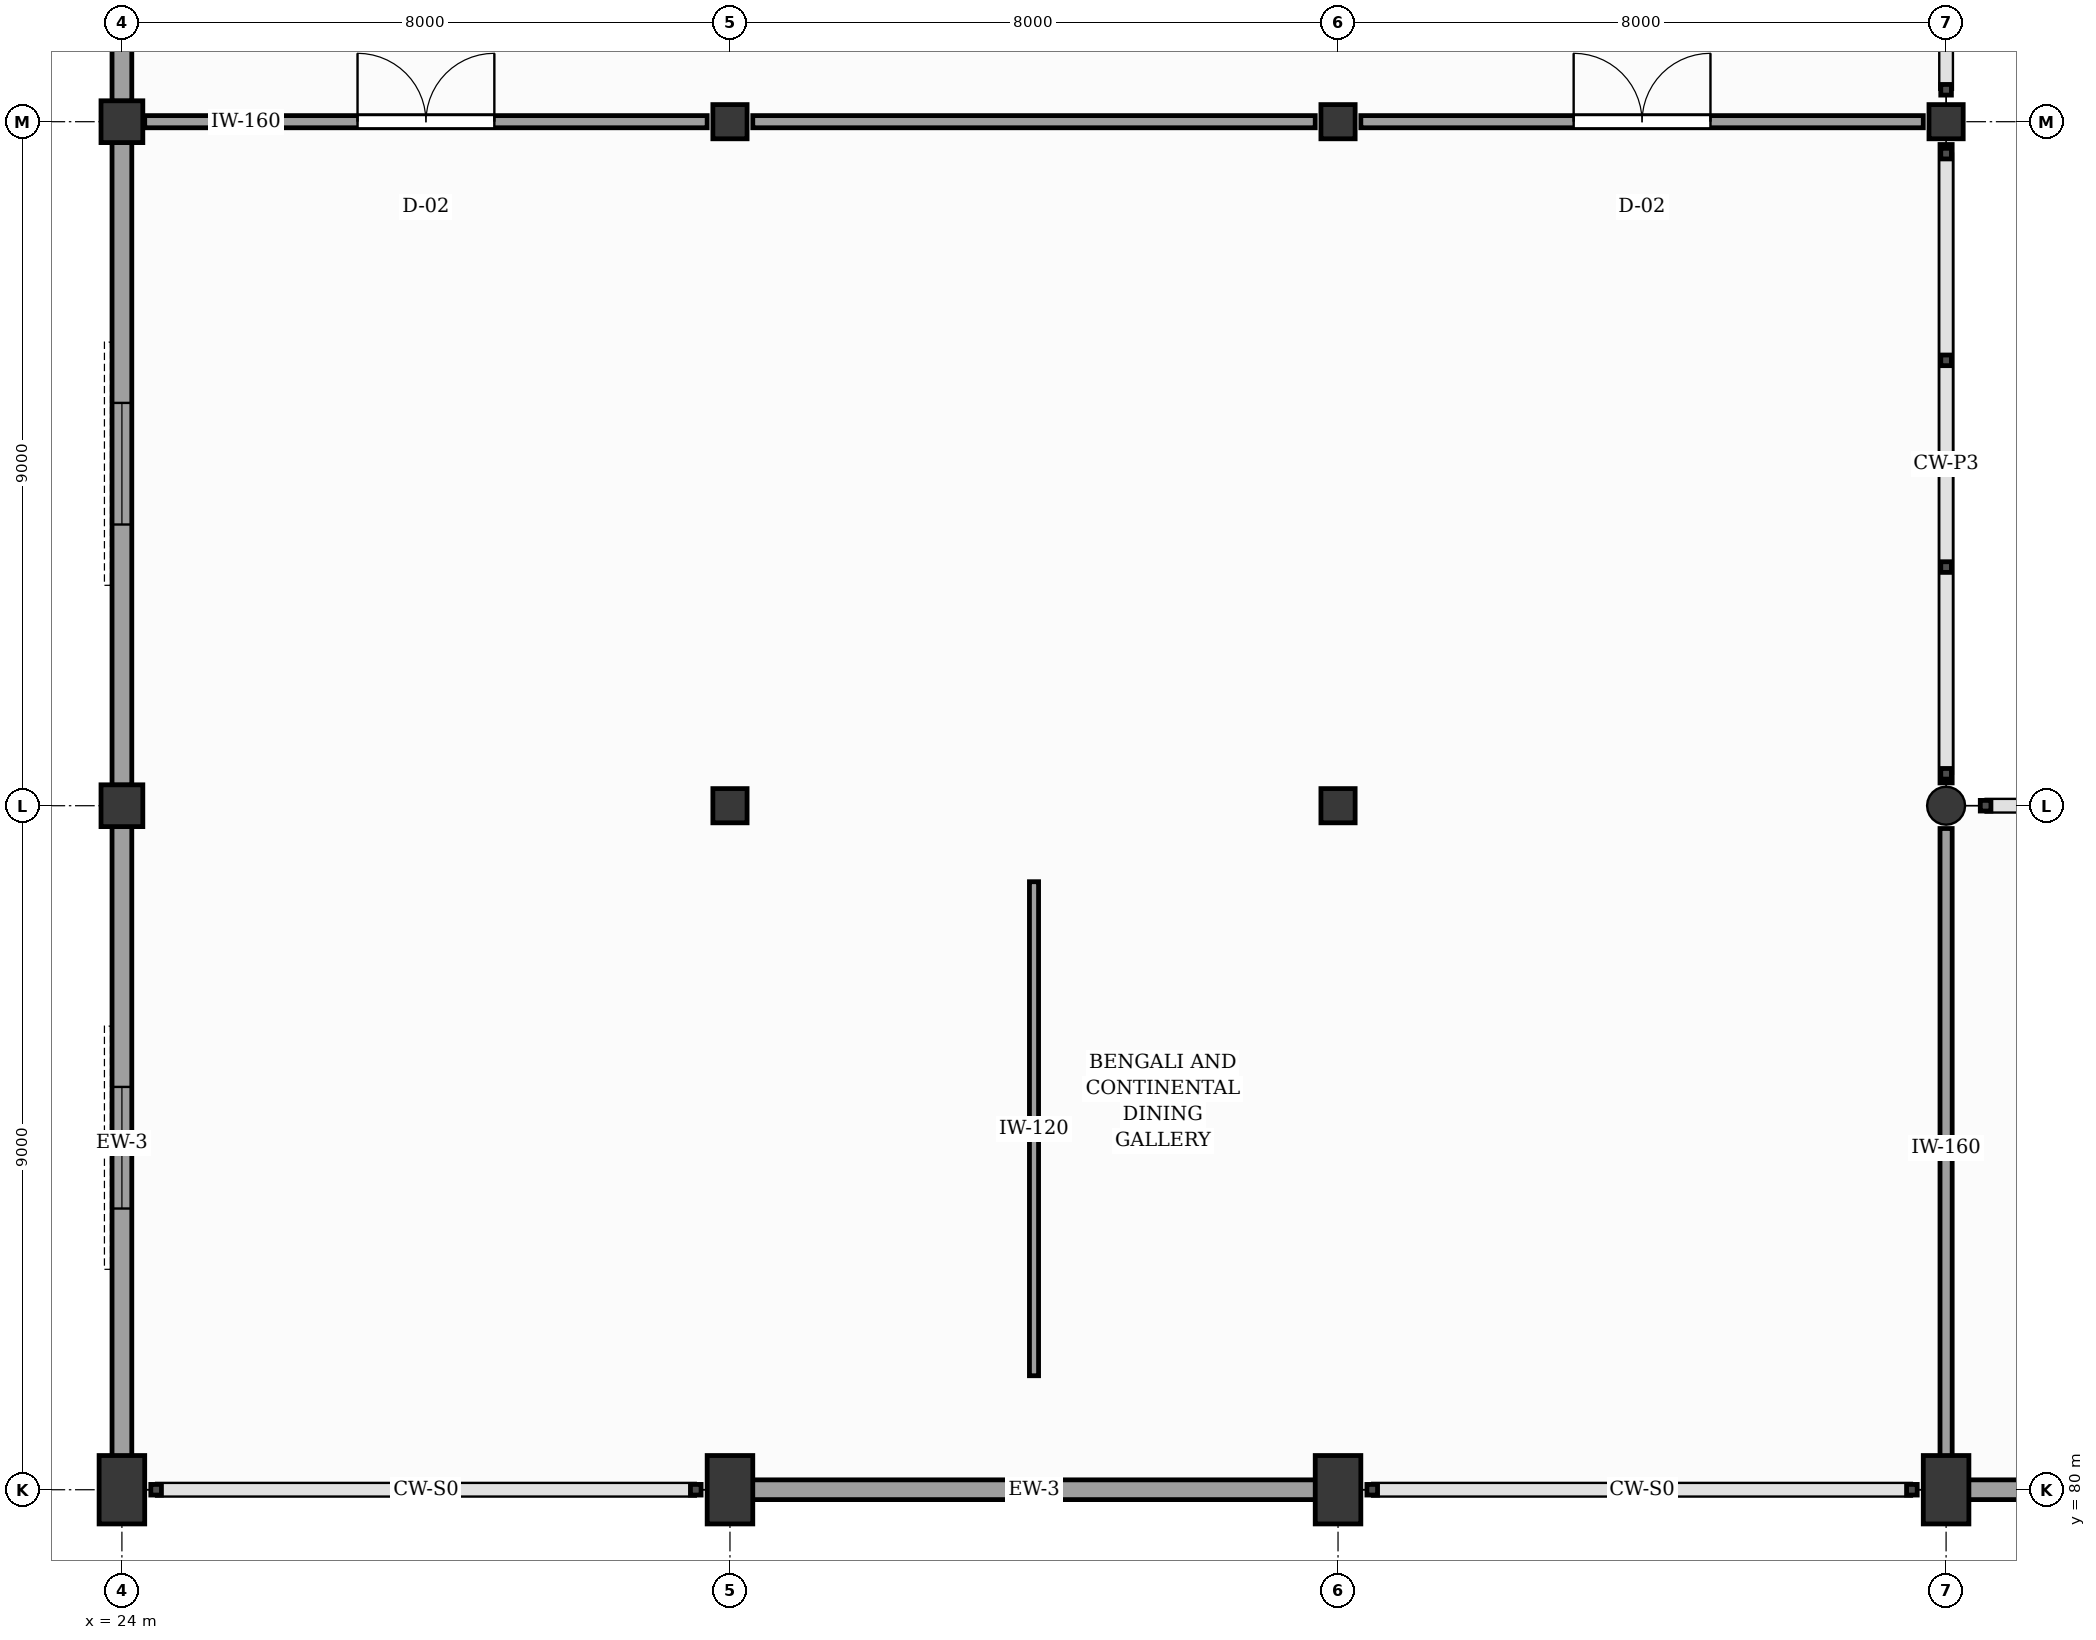
"""IFC4 building model, lengths in metres.
Left out: names, types, materials, properties, quantities, classifications, styles, units other than length and angle.
Written with IfcOpenShell. Run it as: python <this file> out.ifc"""

import sys

from ifc_helpers import new_model, si_unit, direction, frame, frame_2d, origin, origin_2d, place, context, subcontext, project, spatial, rectangle, circle, extrude, element, fill, save


model = new_model("IFC4")
c1 = context("Model", 3, precision=1e-05, world=origin(), true_north=direction((0.0, 1.0)))
c2 = subcontext(c1, "Body", "Model", "MODEL_VIEW")
j1 = project(units=[si_unit("LENGTHUNIT", "METRE"), si_unit("PLANEANGLEUNIT", "RADIAN")], contexts=[c1])
p1 = place(None, origin())
s1 = spatial("IfcSite", under=j1, at=p1, CompositionType="ELEMENT")
p2 = place(p1, origin())
s2 = spatial("IfcBuilding", under=s1, at=p2, CompositionType="ELEMENT")
p3 = place(p2, frame((0.0, 0.0, 16.2)))
s3 = spatial("IfcBuildingStorey", under=s2, at=p3, CompositionType="ELEMENT", Elevation=16.2)
p4 = place(p3, frame((24.0, 80.0, 0.0), z_axis=(0.0, 0.0, 1.0), x_axis=(1.0, 0.0, 0.0)))
e1 = element("IfcColumn", 1, at=p4, inside=s3, PredefinedType="COLUMN", context=c2, shape_type="SweptSolid", body=[
    extrude(rectangle(XDim=0.6, YDim=0.9, at=origin_2d()), origin(), (0.0, 0.0, 1.0), 4.2),
])
for number, where, z_axis, x_axis in (
    (2, (24.0, 89.0, 0.0), (0.0, 0.0, 1.0), (1.0, 0.0, 0.0)),
    (3, (24.0, 98.0, 0.0), (0.0, 0.0, 1.0), (1.0, 0.0, 0.0)),
):
    element("IfcColumn", number, at=place(p3, frame(where, z_axis=z_axis, x_axis=x_axis)), inside=s3, PredefinedType="COLUMN", context=c2, shape_type="SweptSolid", body=[
        extrude(rectangle(XDim=0.55, YDim=0.55, at=origin_2d()), origin(), (0.0, 0.0, 1.0), 4.2),
    ])
p5 = place(p3, frame((32.0, 80.0, 0.0), z_axis=(0.0, 0.0, 1.0), x_axis=(1.0, 0.0, 0.0)))
e4 = element("IfcColumn", 4, at=p5, inside=s3, PredefinedType="COLUMN", context=c2, shape_type="SweptSolid", body=[
    extrude(rectangle(XDim=0.6, YDim=0.9, at=origin_2d()), origin(), (0.0, 0.0, 1.0), 4.2),
])
for number, where, z_axis, x_axis in (
    (5, (32.0, 89.0, 0.0), (0.0, 0.0, 1.0), (1.0, 0.0, 0.0)),
    (6, (32.0, 98.0, 0.0), (0.0, 0.0, 1.0), (1.0, 0.0, 0.0)),
):
    element("IfcColumn", number, at=place(p3, frame(where, z_axis=z_axis, x_axis=x_axis)), inside=s3, PredefinedType="COLUMN", context=c2, shape_type="SweptSolid", body=[
        extrude(rectangle(XDim=0.45, YDim=0.45, at=origin_2d()), origin(), (0.0, 0.0, 1.0), 4.2),
    ])
p6 = place(p3, frame((40.0, 80.0, 0.0), z_axis=(0.0, 0.0, 1.0), x_axis=(1.0, 0.0, 0.0)))
e7 = element("IfcColumn", 7, at=p6, inside=s3, PredefinedType="COLUMN", context=c2, shape_type="SweptSolid", body=[
    extrude(rectangle(XDim=0.6, YDim=0.9, at=origin_2d()), origin(), (0.0, 0.0, 1.0), 4.2),
])
for number, where, z_axis, x_axis in (
    (8, (40.0, 89.0, 0.0), (0.0, 0.0, 1.0), (1.0, 0.0, 0.0)),
    (9, (40.0, 98.0, 0.0), (0.0, 0.0, 1.0), (1.0, 0.0, 0.0)),
):
    element("IfcColumn", number, at=place(p3, frame(where, z_axis=z_axis, x_axis=x_axis)), inside=s3, PredefinedType="COLUMN", context=c2, shape_type="SweptSolid", body=[
        extrude(rectangle(XDim=0.45, YDim=0.45, at=origin_2d()), origin(), (0.0, 0.0, 1.0), 4.2),
    ])
p7 = place(p3, frame((48.0, 80.0, 0.0), z_axis=(0.0, 0.0, 1.0), x_axis=(1.0, 0.0, 0.0)))
e10 = element("IfcColumn", 10, at=p7, inside=s3, PredefinedType="COLUMN", context=c2, shape_type="SweptSolid", body=[
    extrude(rectangle(XDim=0.6, YDim=0.9, at=origin_2d()), origin(), (0.0, 0.0, 1.0), 4.2),
])
p8 = place(p3, frame((48.0, 89.0, 0.0), z_axis=(0.0, 0.0, 1.0), x_axis=(1.0, 0.0, 0.0)))
e11 = element("IfcColumn", 11, at=p8, inside=s3, PredefinedType="COLUMN", context=c2, shape_type="SweptSolid", body=[
    extrude(circle(Radius=0.25, at=origin_2d()), origin(), (0.0, 0.0, 1.0), 4.2),
])
p9 = place(p3, frame((48.0, 98.0, 0.0), z_axis=(0.0, 0.0, 1.0), x_axis=(1.0, 0.0, 0.0)))
e12 = element("IfcColumn", 12, at=p9, inside=s3, PredefinedType="COLUMN", context=c2, shape_type="SweptSolid", body=[
    extrude(rectangle(XDim=0.45, YDim=0.45, at=origin_2d()), origin(), (0.0, 0.0, 1.0), 4.2),
])
for number, where, z_axis, x_axis in (
    (13, (32.295, 80.0, 0.0), (0.0, 0.0, 1.0), (1.0, 0.0, 0.0)),
    (14, (48.295, 80.0, 0.0), (0.0, 0.0, 1.0), (1.0, 0.0, 0.0)),
):
    element("IfcWall", number, at=place(p3, frame(where, z_axis=z_axis, x_axis=x_axis)), inside=s3, PredefinedType="SOLIDWALL", context=c2, shape_type="SweptSolid", body=[
        extrude(rectangle(XDim=7.41, YDim=0.26, at=frame_2d((3.705, 0.0))), origin(), (0.0, 0.0, 1.0), 2.91),
    ])
p10 = place(p3, frame((24.0, 80.4, 0.0), z_axis=(0.0, 0.0, 1.0), x_axis=(0.0, 1.0, 0.0)))
e15 = element("IfcWall", 15, at=p10, inside=s3, PredefinedType="SOLIDWALL", context=c2, shape_type="SweptSolid", body=[
    extrude(rectangle(XDim=8.33, YDim=0.26, at=frame_2d((4.165, 0.0))), origin(), (0.0, 0.0, 1.0), 2.91),
])
p11 = place(p10, frame((3.3, 0.0, 0.95)))
e16 = element("IfcOpeningElement", 16, at=p11, cuts=e15, PredefinedType="OPENING", context=c2, shape_type="SweptSolid", body=[
    extrude(rectangle(XDim=1.6, YDim=1.82, at=frame_2d((0.8, 0.91))), frame((0.0, 0.14, 0.0), z_axis=(0.0, -1.0, 0.0), x_axis=(1.0, 0.0, 0.0)), (0.0, 0.0, 1.0), 0.28),
])
p12 = place(p3, frame((24.0, 89.27, 0.0), z_axis=(0.0, 0.0, 1.0), x_axis=(0.0, 1.0, 0.0)))
e17 = element("IfcWall", 17, at=p12, inside=s3, PredefinedType="SOLIDWALL", context=c2, shape_type="SweptSolid", body=[
    extrude(rectangle(XDim=8.46, YDim=0.26, at=frame_2d((4.23, 0.0))), origin(), (0.0, 0.0, 1.0), 3.24),
])
p13 = place(p12, frame((3.43, 0.0, 0.95)))
e18 = element("IfcOpeningElement", 18, at=p13, cuts=e17, PredefinedType="OPENING", context=c2, shape_type="SweptSolid", body=[
    extrude(rectangle(XDim=1.6, YDim=2.1, at=frame_2d((0.8, 1.05))), frame((0.0, 0.14, 0.0), z_axis=(0.0, -1.0, 0.0), x_axis=(1.0, 0.0, 0.0)), (0.0, 0.0, 1.0), 0.28),
])
p14 = place(p3, frame((24.0, 98.27, 0.0), z_axis=(0.0, 0.0, 1.0), x_axis=(0.0, 1.0, 0.0)))
e19 = element("IfcWall", 19, at=p14, inside=s3, PredefinedType="SOLIDWALL", context=c2, shape_type="SweptSolid", body=[
    extrude(rectangle(XDim=8.46, YDim=0.26, at=frame_2d((4.23, 0.0))), origin(), (0.0, 0.0, 1.0), 3.24),
])
p15 = place(p14, frame((3.43, 0.0, 0.95)))
e20 = element("IfcOpeningElement", 20, at=p15, cuts=e19, PredefinedType="OPENING", context=c2, shape_type="SweptSolid", body=[
    extrude(rectangle(XDim=1.6, YDim=2.1, at=frame_2d((0.8, 1.05))), frame((0.0, 0.14, 0.0), z_axis=(0.0, -1.0, 0.0), x_axis=(1.0, 0.0, 0.0)), (0.0, 0.0, 1.0), 0.28),
])
p16 = place(p3, frame((24.3, 98.0, 0.0), z_axis=(0.0, 0.0, 1.0), x_axis=(1.0, 0.0, 0.0)))
e21 = element("IfcWall", 21, at=p16, inside=s3, PredefinedType="PARTITIONING", context=c2, shape_type="SweptSolid", body=[
    extrude(rectangle(XDim=7.4, YDim=0.16, at=frame_2d((3.7, 0.0))), origin(), (0.0, 0.0, 1.0), 3.1),
])
p17 = place(p16, frame((2.8, 0.0, 0.0)))
e22 = element("IfcOpeningElement", 22, at=p17, cuts=e21, PredefinedType="OPENING", context=c2, shape_type="SweptSolid", body=[
    extrude(rectangle(XDim=1.8, YDim=2.25, at=frame_2d((0.9, 1.125))), frame((0.0, 0.09, 0.0), z_axis=(0.0, -1.0, 0.0), x_axis=(1.0, 0.0, 0.0)), (0.0, 0.0, 1.0), 0.18),
])
p18 = place(p3, frame((32.3, 98.0, 0.0), z_axis=(0.0, 0.0, 1.0), x_axis=(1.0, 0.0, 0.0)))
e23 = element("IfcWall", 23, at=p18, inside=s3, PredefinedType="PARTITIONING", context=c2, shape_type="SweptSolid", body=[
    extrude(rectangle(XDim=7.4, YDim=0.16, at=frame_2d((3.7, 0.0))), origin(), (0.0, 0.0, 1.0), 3.1),
])
p19 = place(p3, frame((40.3, 98.0, 0.0), z_axis=(0.0, 0.0, 1.0), x_axis=(1.0, 0.0, 0.0)))
e24 = element("IfcWall", 24, at=p19, inside=s3, PredefinedType="PARTITIONING", context=c2, shape_type="SweptSolid", body=[
    extrude(rectangle(XDim=7.4, YDim=0.16, at=frame_2d((3.7, 0.0))), origin(), (0.0, 0.0, 1.0), 3.1),
])
p20 = place(p19, frame((2.8, 0.0, 0.0)))
e25 = element("IfcOpeningElement", 25, at=p20, cuts=e24, PredefinedType="OPENING", context=c2, shape_type="SweptSolid", body=[
    extrude(rectangle(XDim=1.8, YDim=2.25, at=frame_2d((0.9, 1.125))), frame((0.0, 0.09, 0.0), z_axis=(0.0, -1.0, 0.0), x_axis=(1.0, 0.0, 0.0)), (0.0, 0.0, 1.0), 0.18),
])
p21 = place(p3, frame((48.0, 80.3, 0.0), z_axis=(0.0, 0.0, 1.0), x_axis=(0.0, 1.0, 0.0)))
e26 = element("IfcWall", 26, at=p21, inside=s3, PredefinedType="PARTITIONING", context=c2, shape_type="SweptSolid", body=[
    extrude(rectangle(XDim=8.4, YDim=0.16, at=frame_2d((4.2, 0.0))), origin(), (0.0, 0.0, 1.0), 2.91),
])
p22 = place(p3, frame((48.0, 89.3, 0.0), z_axis=(0.0, 0.0, 1.0), x_axis=(0.0, 1.0, 0.0)))
e27 = element("IfcWall", 27, at=p22, inside=s3, PredefinedType="PARTITIONING", context=c2, shape_type="SweptSolid", body=[
    extrude(rectangle(XDim=8.4, YDim=0.16, at=frame_2d((4.2, 0.0))), origin(), (0.0, 0.0, 1.0), 3.1),
])
p23 = place(p3, frame((36.0, 81.5, 0.0), z_axis=(0.0, 0.0, 1.0), x_axis=(0.0, 1.0, 0.0)))
e28 = element("IfcWall", 28, at=p23, inside=s3, PredefinedType="MOVABLE", context=c2, shape_type="SweptSolid", body=[
    extrude(rectangle(XDim=6.5, YDim=0.12, at=frame_2d((3.25, 0.0))), origin(), (0.0, 0.0, 1.0), 2.8),
])
p24 = place(p11, origin())
e29 = element("IfcWindow", 29, at=p24, inside=s3, PartitioningType="SINGLE_PANEL", PredefinedType="WINDOW", context=c2, shape_type="SweptSolid", body=[
    extrude(rectangle(XDim=1.6, YDim=1.82, at=frame_2d((0.8, 0.91))), frame((0.0, 0.03, 0.0), z_axis=(0.0, -1.0, 0.0), x_axis=(1.0, 0.0, 0.0)), (0.0, 0.0, 1.0), 0.06),
])
fill(e16, e29)
p25 = place(p13, origin())
e30 = element("IfcWindow", 30, at=p25, inside=s3, PartitioningType="SINGLE_PANEL", PredefinedType="WINDOW", context=c2, shape_type="SweptSolid", body=[
    extrude(rectangle(XDim=1.6, YDim=2.1, at=frame_2d((0.8, 1.05))), frame((0.0, 0.03, 0.0), z_axis=(0.0, -1.0, 0.0), x_axis=(1.0, 0.0, 0.0)), (0.0, 0.0, 1.0), 0.06),
])
fill(e18, e30)
p26 = place(p17, origin())
e31 = element("IfcDoor", 31, at=p26, inside=s3, OperationType="DOUBLE_DOOR_SINGLE_SWING", PredefinedType="DOOR", context=c2, shape_type="SweptSolid", body=[
    extrude(rectangle(XDim=1.8, YDim=2.25, at=frame_2d((0.9, 1.125))), frame((0.0, 0.025, 0.0), z_axis=(0.0, -1.0, 0.0), x_axis=(1.0, 0.0, 0.0)), (0.0, 0.0, 1.0), 0.05),
])
fill(e22, e31)
p27 = place(p20, origin())
e32 = element("IfcDoor", 32, at=p27, inside=s3, OperationType="DOUBLE_DOOR_SINGLE_SWING", PredefinedType="DOOR", context=c2, shape_type="SweptSolid", body=[
    extrude(rectangle(XDim=1.8, YDim=2.25, at=frame_2d((0.9, 1.125))), frame((0.0, 0.025, 0.0), z_axis=(0.0, -1.0, 0.0), x_axis=(1.0, 0.0, 0.0)), (0.0, 0.0, 1.0), 0.05),
])
fill(e25, e32)
save(model, sys.argv[1])
